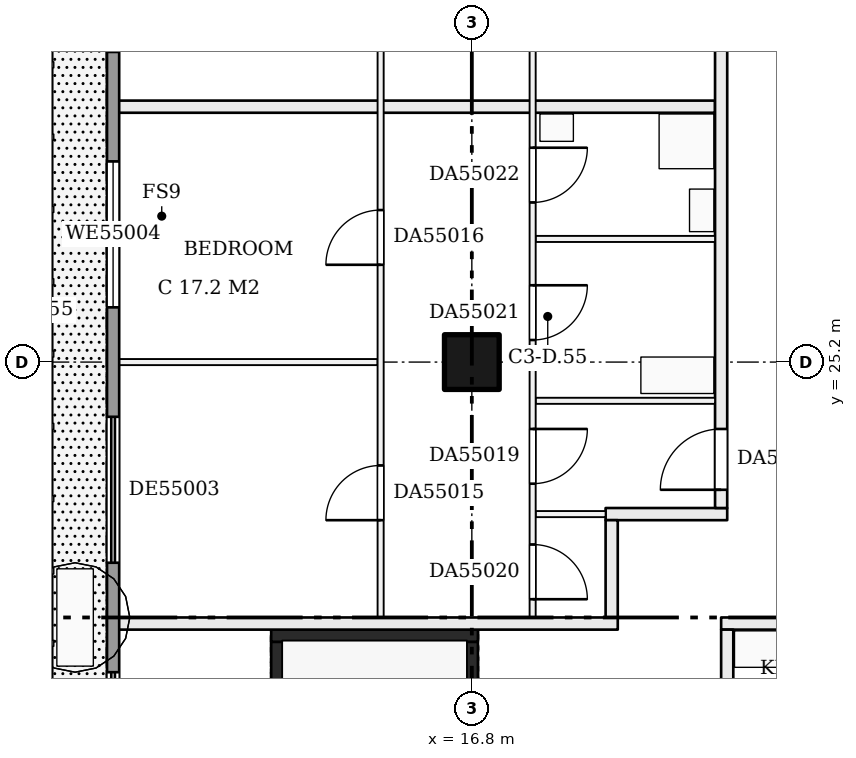
"""IFC4 building model, lengths in metres.
Left out: names, types, materials, properties, quantities, classifications, styles, units other than length and angle.
Written with IfcOpenShell. Run it as: python <this file> out.ifc"""

import sys

from ifc_helpers import new_model, si_unit, direction, frame, frame_2d, origin, origin_2d, place, context, subcontext, project, spatial, rectangle, extrude, element, fill, save


model = new_model("IFC4")
c1 = context("Model", 3, precision=1e-05, world=origin(), true_north=direction((0.0, 1.0)))
c2 = subcontext(c1, "Body", "Model", "MODEL_VIEW")
j1 = project(units=[si_unit("LENGTHUNIT", "METRE"), si_unit("PLANEANGLEUNIT", "RADIAN")], contexts=[c1])
p1 = place(None, origin())
s1 = spatial("IfcSite", under=j1, at=p1, CompositionType="ELEMENT")
p2 = place(p1, origin())
s2 = spatial("IfcBuilding", under=s1, at=p2, CompositionType="ELEMENT")
p3 = place(p2, frame((0.0, 0.0, 214.2)))
s3 = spatial("IfcBuildingStorey", under=s2, at=p3, CompositionType="ELEMENT", Elevation=214.2)
p4 = place(p3, frame((16.8, 25.2, 0.0), z_axis=(0.0, 0.0, 1.0), x_axis=(1.0, 0.0, 0.0)))
e1 = element("IfcColumn", 1, at=p4, inside=s3, PredefinedType="COLUMN", context=c2, shape_type="SweptSolid", body=[
    extrude(rectangle(XDim=0.9, YDim=0.9, at=origin_2d()), origin(), (0.0, 0.0, 1.0), 3.22),
])
p5 = place(p3, frame((13.6, 13.8, 0.0), z_axis=(0.0, 0.0, 1.0), x_axis=(0.0, 1.0, 0.0)))
e2 = element("IfcWall", 2, at=p5, inside=s3, PredefinedType="SHEAR", context=c2, shape_type="SweptSolid", body=[
    extrude(rectangle(XDim=6.8, YDim=0.2, at=frame_2d((3.4, 0.0))), origin(), (0.0, 0.0, 1.0), 3.22),
])
p6 = place(p3, frame((16.8, 13.8, 0.0), z_axis=(0.0, 0.0, 1.0), x_axis=(0.0, 1.0, 0.0)))
e3 = element("IfcWall", 3, at=p6, inside=s3, PredefinedType="SHEAR", context=c2, shape_type="SweptSolid", body=[
    extrude(rectangle(XDim=6.8, YDim=0.2, at=frame_2d((3.4, 0.0))), origin(), (0.0, 0.0, 1.0), 3.22),
])
p7 = place(p6, frame((0.1, 0.0, 0.0)))
e4 = element("IfcOpeningElement", 4, at=p7, cuts=e3, PredefinedType="OPENING", context=c2, shape_type="SweptSolid", body=[
    extrude(rectangle(XDim=1.0, YDim=2.1, at=frame_2d((0.5, 1.05))), frame((0.0, 0.11, 0.0), z_axis=(0.0, -1.0, 0.0), x_axis=(1.0, 0.0, 0.0)), (0.0, 0.0, 1.0), 0.22),
])
p8 = place(p3, frame((13.5, 20.7, 0.0), z_axis=(0.0, 0.0, 1.0), x_axis=(1.0, 0.0, 0.0)))
e5 = element("IfcWall", 5, at=p8, inside=s3, PredefinedType="SHEAR", context=c2, shape_type="SweptSolid", body=[
    extrude(rectangle(XDim=3.4, YDim=0.2, at=frame_2d((1.7, 0.0))), origin(), (0.0, 0.0, 1.0), 3.22),
])
p9 = place(p3, frame((10.9, 20.9, 0.0), z_axis=(0.0, 0.0, 1.0), x_axis=(1.0, 0.0, 0.0)))
e6 = element("IfcWall", 6, at=p9, inside=s3, PredefinedType="PARTITIONING", context=c2, shape_type="SweptSolid", body=[
    extrude(rectangle(XDim=8.3, YDim=0.2, at=frame_2d((4.15, 0.0))), origin(), (0.0, 0.0, 1.0), 3.22),
])
p10 = place(p3, frame((20.9, 20.9, 0.0), z_axis=(0.0, 0.0, 1.0), x_axis=(1.0, 0.0, 0.0)))
e7 = element("IfcWall", 7, at=p10, inside=s3, PredefinedType="PARTITIONING", context=c2, shape_type="SweptSolid", body=[
    extrude(rectangle(XDim=19.3, YDim=0.2, at=frame_2d((9.65, 0.0))), origin(), (0.0, 0.0, 1.0), 3.22),
])
p11 = place(p10, frame((7.016, 0.0, 0.0)))
e8 = element("IfcOpeningElement", 8, at=p11, cuts=e7, PredefinedType="OPENING", context=c2, shape_type="SweptSolid", body=[
    extrude(rectangle(XDim=1.0, YDim=2.1, at=frame_2d((0.5, 1.05))), frame((0.0, 0.11, 0.0), z_axis=(0.0, -1.0, 0.0), x_axis=(1.0, 0.0, 0.0)), (0.0, 0.0, 1.0), 0.22),
])
p12 = place(p10, frame((13.633, 0.0, 0.0)))
e9 = element("IfcOpeningElement", 9, at=p12, cuts=e7, PredefinedType="OPENING", context=c2, shape_type="SweptSolid", body=[
    extrude(rectangle(XDim=1.0, YDim=2.1, at=frame_2d((0.5, 1.05))), frame((0.0, 0.11, 0.0), z_axis=(0.0, -1.0, 0.0), x_axis=(1.0, 0.0, 0.0)), (0.0, 0.0, 1.0), 0.22),
])
p13 = place(p3, frame((17.85, 22.7, 0.0), z_axis=(0.0, 0.0, 1.0), x_axis=(1.0, 0.0, 0.0)))
e10 = element("IfcWall", 10, at=p13, inside=s3, PredefinedType="PARTITIONING", context=c2, shape_type="SweptSolid", body=[
    extrude(rectangle(XDim=1.15, YDim=0.1, at=frame_2d((0.575, 0.0))), origin(), (0.0, 0.0, 1.0), 3.22),
])
p14 = place(p3, frame((19.0, 22.7, 0.0), z_axis=(0.0, 0.0, 1.0), x_axis=(1.0, 0.0, 0.0)))
e11 = element("IfcWall", 11, at=p14, inside=s3, PredefinedType="PARTITIONING", context=c2, shape_type="SweptSolid", body=[
    extrude(rectangle(XDim=2.0, YDim=0.2, at=frame_2d((1.0, 0.0))), origin(), (0.0, 0.0, 1.0), 3.22),
])
p15 = place(p3, frame((17.85, 24.563, 0.0), z_axis=(0.0, 0.0, 1.0), x_axis=(1.0, 0.0, 0.0)))
e12 = element("IfcWall", 12, at=p15, inside=s3, PredefinedType="PARTITIONING", context=c2, shape_type="SweptSolid", body=[
    extrude(rectangle(XDim=2.95, YDim=0.1, at=frame_2d((1.475, 0.0))), origin(), (0.0, 0.0, 1.0), 3.22),
])
p16 = place(p3, frame((10.9, 25.2, 0.0), z_axis=(0.0, 0.0, 1.0), x_axis=(1.0, 0.0, 0.0)))
e13 = element("IfcWall", 13, at=p16, inside=s3, PredefinedType="PARTITIONING", context=c2, shape_type="SweptSolid", body=[
    extrude(rectangle(XDim=4.35, YDim=0.1, at=frame_2d((2.175, 0.0))), origin(), (0.0, 0.0, 1.0), 3.22),
])
p17 = place(p3, frame((17.85, 27.225, 0.0), z_axis=(0.0, 0.0, 1.0), x_axis=(1.0, 0.0, 0.0)))
e14 = element("IfcWall", 14, at=p17, inside=s3, PredefinedType="PARTITIONING", context=c2, shape_type="SweptSolid", body=[
    extrude(rectangle(XDim=2.95, YDim=0.1, at=frame_2d((1.475, 0.0))), origin(), (0.0, 0.0, 1.0), 3.22),
])
p18 = place(p3, frame((10.9, 29.4, 0.0), z_axis=(0.0, 0.0, 1.0), x_axis=(1.0, 0.0, 0.0)))
e15 = element("IfcWall", 15, at=p18, inside=s3, PredefinedType="PARTITIONING", context=c2, shape_type="SweptSolid", body=[
    extrude(rectangle(XDim=9.9, YDim=0.2, at=frame_2d((4.95, 0.0))), origin(), (0.0, 0.0, 1.0), 3.22),
])
p19 = place(p3, frame((15.3, 21.0, 0.0), z_axis=(0.0, 0.0, 1.0), x_axis=(0.0, 1.0, 0.0)))
e16 = element("IfcWall", 16, at=p19, inside=s3, PredefinedType="PARTITIONING", context=c2, shape_type="SweptSolid", body=[
    extrude(rectangle(XDim=19.0, YDim=0.1, at=frame_2d((9.5, 0.0))), origin(), (0.0, 0.0, 1.0), 3.22),
])
p20 = place(p19, frame((1.6, 0.0, 0.0)))
e17 = element("IfcOpeningElement", 17, at=p20, cuts=e16, PredefinedType="OPENING", context=c2, shape_type="SweptSolid", body=[
    extrude(rectangle(XDim=0.9, YDim=2.1, at=frame_2d((0.45, 1.05))), frame((0.0, 0.06, 0.0), z_axis=(0.0, -1.0, 0.0), x_axis=(1.0, 0.0, 0.0)), (0.0, 0.0, 1.0), 0.12),
])
p21 = place(p19, frame((5.8, 0.0, 0.0)))
e18 = element("IfcOpeningElement", 18, at=p21, cuts=e16, PredefinedType="OPENING", context=c2, shape_type="SweptSolid", body=[
    extrude(rectangle(XDim=0.9, YDim=2.1, at=frame_2d((0.45, 1.05))), frame((0.0, 0.06, 0.0), z_axis=(0.0, -1.0, 0.0), x_axis=(1.0, 0.0, 0.0)), (0.0, 0.0, 1.0), 0.12),
])
p22 = place(p19, frame((10.0, 0.0, 0.0)))
e19 = element("IfcOpeningElement", 19, at=p22, cuts=e16, PredefinedType="OPENING", context=c2, shape_type="SweptSolid", body=[
    extrude(rectangle(XDim=0.9, YDim=2.1, at=frame_2d((0.45, 1.05))), frame((0.0, 0.06, 0.0), z_axis=(0.0, -1.0, 0.0), x_axis=(1.0, 0.0, 0.0)), (0.0, 0.0, 1.0), 0.12),
])
p23 = place(p19, frame((15.4, 0.0, 0.0)))
e20 = element("IfcOpeningElement", 20, at=p23, cuts=e16, PredefinedType="OPENING", context=c2, shape_type="SweptSolid", body=[
    extrude(rectangle(XDim=0.9, YDim=2.1, at=frame_2d((0.45, 1.05))), frame((0.0, 0.06, 0.0), z_axis=(0.0, -1.0, 0.0), x_axis=(1.0, 0.0, 0.0)), (0.0, 0.0, 1.0), 0.12),
])
p24 = place(p3, frame((17.8, 21.0, 0.0), z_axis=(0.0, 0.0, 1.0), x_axis=(0.0, 1.0, 0.0)))
e21 = element("IfcWall", 21, at=p24, inside=s3, PredefinedType="PARTITIONING", context=c2, shape_type="SweptSolid", body=[
    extrude(rectangle(XDim=19.0, YDim=0.1, at=frame_2d((9.5, 0.0))), origin(), (0.0, 0.0, 1.0), 3.22),
])
p25 = place(p24, frame((2.2, 0.0, 0.0)))
e22 = element("IfcOpeningElement", 22, at=p25, cuts=e21, PredefinedType="OPENING", context=c2, shape_type="SweptSolid", body=[
    extrude(rectangle(XDim=0.9, YDim=2.1, at=frame_2d((0.45, 1.05))), frame((0.0, 0.06, 0.0), z_axis=(0.0, -1.0, 0.0), x_axis=(1.0, 0.0, 0.0)), (0.0, 0.0, 1.0), 0.12),
])
p26 = place(p24, frame((0.3, 0.0, 0.0)))
e23 = element("IfcOpeningElement", 23, at=p26, cuts=e21, PredefinedType="OPENING", context=c2, shape_type="SweptSolid", body=[
    extrude(rectangle(XDim=0.9, YDim=2.1, at=frame_2d((0.45, 1.05))), frame((0.0, 0.06, 0.0), z_axis=(0.0, -1.0, 0.0), x_axis=(1.0, 0.0, 0.0)), (0.0, 0.0, 1.0), 0.12),
])
p27 = place(p24, frame((4.563, 0.0, 0.0)))
e24 = element("IfcOpeningElement", 24, at=p27, cuts=e21, PredefinedType="OPENING", context=c2, shape_type="SweptSolid", body=[
    extrude(rectangle(XDim=0.9, YDim=2.1, at=frame_2d((0.45, 1.05))), frame((0.0, 0.06, 0.0), z_axis=(0.0, -1.0, 0.0), x_axis=(1.0, 0.0, 0.0)), (0.0, 0.0, 1.0), 0.12),
])
p28 = place(p24, frame((6.825, 0.0, 0.0)))
e25 = element("IfcOpeningElement", 25, at=p28, cuts=e21, PredefinedType="OPENING", context=c2, shape_type="SweptSolid", body=[
    extrude(rectangle(XDim=0.9, YDim=2.1, at=frame_2d((0.45, 1.05))), frame((0.0, 0.06, 0.0), z_axis=(0.0, -1.0, 0.0), x_axis=(1.0, 0.0, 0.0)), (0.0, 0.0, 1.0), 0.12),
])
p29 = place(p24, frame((9.6, 0.0, 0.0)))
e26 = element("IfcOpeningElement", 26, at=p29, cuts=e21, PredefinedType="OPENING", context=c2, shape_type="SweptSolid", body=[
    extrude(rectangle(XDim=0.9, YDim=2.1, at=frame_2d((0.45, 1.05))), frame((0.0, 0.06, 0.0), z_axis=(0.0, -1.0, 0.0), x_axis=(1.0, 0.0, 0.0)), (0.0, 0.0, 1.0), 0.12),
])
p30 = place(p24, frame((13.233, 0.0, 0.0)))
e27 = element("IfcOpeningElement", 27, at=p30, cuts=e21, PredefinedType="OPENING", context=c2, shape_type="SweptSolid", body=[
    extrude(rectangle(XDim=0.9, YDim=2.1, at=frame_2d((0.45, 1.05))), frame((0.0, 0.06, 0.0), z_axis=(0.0, -1.0, 0.0), x_axis=(1.0, 0.0, 0.0)), (0.0, 0.0, 1.0), 0.12),
])
p31 = place(p24, frame((16.967, 0.0, 0.0)))
e28 = element("IfcOpeningElement", 28, at=p31, cuts=e21, PredefinedType="OPENING", context=c2, shape_type="SweptSolid", body=[
    extrude(rectangle(XDim=0.9, YDim=2.1, at=frame_2d((0.45, 1.05))), frame((0.0, 0.06, 0.0), z_axis=(0.0, -1.0, 0.0), x_axis=(1.0, 0.0, 0.0)), (0.0, 0.0, 1.0), 0.12),
])
p32 = place(p3, frame((19.1, 21.0, 0.0), z_axis=(0.0, 0.0, 1.0), x_axis=(0.0, 1.0, 0.0)))
e29 = element("IfcWall", 29, at=p32, inside=s3, PredefinedType="PARTITIONING", context=c2, shape_type="SweptSolid", body=[
    extrude(rectangle(XDim=1.6, YDim=0.2, at=frame_2d((0.8, 0.0))), origin(), (0.0, 0.0, 1.0), 3.22),
])
p33 = place(p3, frame((20.9, 22.8, 0.0), z_axis=(0.0, 0.0, 1.0), x_axis=(0.0, 1.0, 0.0)))
e30 = element("IfcWall", 30, at=p33, inside=s3, PredefinedType="PARTITIONING", context=c2, shape_type="SweptSolid", body=[
    extrude(rectangle(XDim=17.2, YDim=0.2, at=frame_2d((8.6, 0.0))), origin(), (0.0, 0.0, 1.0), 3.22),
])
p34 = place(p33, frame((0.3, 0.0, 0.0)))
e31 = element("IfcOpeningElement", 31, at=p34, cuts=e30, PredefinedType="OPENING", context=c2, shape_type="SweptSolid", body=[
    extrude(rectangle(XDim=1.0, YDim=2.1, at=frame_2d((0.5, 1.05))), frame((0.0, 0.11, 0.0), z_axis=(0.0, -1.0, 0.0), x_axis=(1.0, 0.0, 0.0)), (0.0, 0.0, 1.0), 0.22),
])
p35 = place(p33, frame((7.7, 0.0, 0.0)))
e32 = element("IfcOpeningElement", 32, at=p35, cuts=e30, PredefinedType="OPENING", context=c2, shape_type="SweptSolid", body=[
    extrude(rectangle(XDim=1.0, YDim=2.1, at=frame_2d((0.5, 1.05))), frame((0.0, 0.11, 0.0), z_axis=(0.0, -1.0, 0.0), x_axis=(1.0, 0.0, 0.0)), (0.0, 0.0, 1.0), 0.22),
])
p36 = place(p3, frame((21.0, 13.7, 0.0), z_axis=(0.0, 0.0, 1.0), x_axis=(0.0, 1.0, 0.0)))
e33 = element("IfcWall", 33, at=p36, inside=s3, PredefinedType="PARTITIONING", context=c2, shape_type="SweptSolid", body=[
    extrude(rectangle(XDim=7.1, YDim=0.2, at=frame_2d((3.55, 0.0))), origin(), (0.0, 0.0, 1.0), 3.22),
])
p37 = place(p3, frame((10.9, 42.0, 0.0), z_axis=(0.0, 0.0, 1.0), x_axis=(0.0, -1.0, 0.0)))
e34 = element("IfcWall", 34, at=p37, inside=s3, PredefinedType="SOLIDWALL", context=c2, shape_type="SweptSolid", body=[
    extrude(rectangle(XDim=28.6, YDim=0.2, at=frame_2d((14.3, 0.0))), origin(), (0.0, 0.0, 1.0), 3.22),
])
p38 = place(p37, frame((25.9, 0.0, 0.0)))
e35 = element("IfcOpeningElement", 35, at=p38, cuts=e34, PredefinedType="OPENING", context=c2, shape_type="SweptSolid", body=[
    extrude(rectangle(XDim=2.4, YDim=2.2, at=frame_2d((1.2, 1.1))), frame((0.0, 0.11, 0.0), z_axis=(0.0, -1.0, 0.0), x_axis=(1.0, 0.0, 0.0)), (0.0, 0.0, 1.0), 0.22),
])
p39 = place(p37, frame((21.9, 0.0, 0.0)))
e36 = element("IfcOpeningElement", 36, at=p39, cuts=e34, PredefinedType="OPENING", context=c2, shape_type="SweptSolid", body=[
    extrude(rectangle(XDim=2.4, YDim=2.2, at=frame_2d((1.2, 1.1))), frame((0.0, 0.11, 0.0), z_axis=(0.0, -1.0, 0.0), x_axis=(1.0, 0.0, 0.0)), (0.0, 0.0, 1.0), 0.22),
])
p40 = place(p37, frame((17.7, 0.0, 0.0)))
e37 = element("IfcOpeningElement", 37, at=p40, cuts=e34, PredefinedType="OPENING", context=c2, shape_type="SweptSolid", body=[
    extrude(rectangle(XDim=2.4, YDim=2.2, at=frame_2d((1.2, 1.1))), frame((0.0, 0.11, 0.0), z_axis=(0.0, -1.0, 0.0), x_axis=(1.0, 0.0, 0.0)), (0.0, 0.0, 1.0), 0.22),
])
p41 = place(p37, frame((13.5, 0.0, 0.9)))
e38 = element("IfcOpeningElement", 38, at=p41, cuts=e34, PredefinedType="OPENING", context=c2, shape_type="SweptSolid", body=[
    extrude(rectangle(XDim=2.4, YDim=1.5, at=frame_2d((1.2, 0.75))), frame((0.0, 0.11, 0.0), z_axis=(0.0, -1.0, 0.0), x_axis=(1.0, 0.0, 0.0)), (0.0, 0.0, 1.0), 0.22),
])
p42 = place(p37, frame((9.3, 0.0, 0.0)))
e39 = element("IfcOpeningElement", 39, at=p42, cuts=e34, PredefinedType="OPENING", context=c2, shape_type="SweptSolid", body=[
    extrude(rectangle(XDim=2.4, YDim=2.2, at=frame_2d((1.2, 1.1))), frame((0.0, 0.11, 0.0), z_axis=(0.0, -1.0, 0.0), x_axis=(1.0, 0.0, 0.0)), (0.0, 0.0, 1.0), 0.22),
])
p43 = place(p37, frame((5.1, 0.0, 0.9)))
e40 = element("IfcOpeningElement", 40, at=p43, cuts=e34, PredefinedType="OPENING", context=c2, shape_type="SweptSolid", body=[
    extrude(rectangle(XDim=2.4, YDim=1.5, at=frame_2d((1.2, 0.75))), frame((0.0, 0.11, 0.0), z_axis=(0.0, -1.0, 0.0), x_axis=(1.0, 0.0, 0.0)), (0.0, 0.0, 1.0), 0.22),
])
p44 = place(p37, frame((2.0, 0.0, 0.9)))
e41 = element("IfcOpeningElement", 41, at=p44, cuts=e34, PredefinedType="OPENING", context=c2, shape_type="SweptSolid", body=[
    extrude(rectangle(XDim=1.3, YDim=1.5, at=frame_2d((0.65, 0.75))), frame((0.0, 0.11, 0.0), z_axis=(0.0, -1.0, 0.0), x_axis=(1.0, 0.0, 0.0)), (0.0, 0.0, 1.0), 0.22),
])
p45 = place(p20, origin())
e42 = element("IfcDoor", 42, at=p45, inside=s3, OperationType="SINGLE_SWING_LEFT", PredefinedType="DOOR", context=c2, shape_type="SweptSolid", body=[
    extrude(rectangle(XDim=0.9, YDim=2.1, at=frame_2d((0.45, 1.05))), frame((0.0, 0.025, 0.0), z_axis=(0.0, -1.0, 0.0), x_axis=(1.0, 0.0, 0.0)), (0.0, 0.0, 1.0), 0.05),
])
fill(e17, e42)
p46 = place(p21, origin())
e43 = element("IfcDoor", 43, at=p46, inside=s3, OperationType="SINGLE_SWING_LEFT", PredefinedType="DOOR", context=c2, shape_type="SweptSolid", body=[
    extrude(rectangle(XDim=0.9, YDim=2.1, at=frame_2d((0.45, 1.05))), frame((0.0, 0.025, 0.0), z_axis=(0.0, -1.0, 0.0), x_axis=(1.0, 0.0, 0.0)), (0.0, 0.0, 1.0), 0.05),
])
fill(e18, e43)
p47 = place(p25, frame((0.9, 0.0, 0.0), z_axis=(0.0, 0.0, 1.0), x_axis=(-1.0, 0.0, 0.0)))
e44 = element("IfcDoor", 44, at=p47, inside=s3, OperationType="SINGLE_SWING_LEFT", PredefinedType="DOOR", context=c2, shape_type="SweptSolid", body=[
    extrude(rectangle(XDim=0.9, YDim=2.1, at=frame_2d((0.45, 1.05))), frame((0.0, 0.025, 0.0), z_axis=(0.0, -1.0, 0.0), x_axis=(1.0, 0.0, 0.0)), (0.0, 0.0, 1.0), 0.05),
])
fill(e22, e44)
p48 = place(p26, frame((0.9, 0.0, 0.0), z_axis=(0.0, 0.0, 1.0), x_axis=(-1.0, 0.0, 0.0)))
e45 = element("IfcDoor", 45, at=p48, inside=s3, OperationType="SINGLE_SWING_RIGHT", PredefinedType="DOOR", context=c2, shape_type="SweptSolid", body=[
    extrude(rectangle(XDim=0.9, YDim=2.1, at=frame_2d((0.45, 1.05))), frame((0.0, 0.025, 0.0), z_axis=(0.0, -1.0, 0.0), x_axis=(1.0, 0.0, 0.0)), (0.0, 0.0, 1.0), 0.05),
])
fill(e23, e45)
p49 = place(p27, frame((0.9, 0.0, 0.0), z_axis=(0.0, 0.0, 1.0), x_axis=(-1.0, 0.0, 0.0)))
e46 = element("IfcDoor", 46, at=p49, inside=s3, OperationType="SINGLE_SWING_LEFT", PredefinedType="DOOR", context=c2, shape_type="SweptSolid", body=[
    extrude(rectangle(XDim=0.9, YDim=2.1, at=frame_2d((0.45, 1.05))), frame((0.0, 0.025, 0.0), z_axis=(0.0, -1.0, 0.0), x_axis=(1.0, 0.0, 0.0)), (0.0, 0.0, 1.0), 0.05),
])
fill(e24, e46)
p50 = place(p28, frame((0.9, 0.0, 0.0), z_axis=(0.0, 0.0, 1.0), x_axis=(-1.0, 0.0, 0.0)))
e47 = element("IfcDoor", 47, at=p50, inside=s3, OperationType="SINGLE_SWING_LEFT", PredefinedType="DOOR", context=c2, shape_type="SweptSolid", body=[
    extrude(rectangle(XDim=0.9, YDim=2.1, at=frame_2d((0.45, 1.05))), frame((0.0, 0.025, 0.0), z_axis=(0.0, -1.0, 0.0), x_axis=(1.0, 0.0, 0.0)), (0.0, 0.0, 1.0), 0.05),
])
fill(e25, e47)
p51 = place(p34, origin())
e48 = element("IfcDoor", 48, at=p51, inside=s3, OperationType="SINGLE_SWING_LEFT", PredefinedType="DOOR", context=c2, shape_type="SweptSolid", body=[
    extrude(rectangle(XDim=1.0, YDim=2.1, at=frame_2d((0.5, 1.05))), frame((0.0, 0.025, 0.0), z_axis=(0.0, -1.0, 0.0), x_axis=(1.0, 0.0, 0.0)), (0.0, 0.0, 1.0), 0.05),
])
fill(e31, e48)
p52 = place(p39, origin())
e49 = element("IfcDoor", 49, at=p52, inside=s3, OperationType="DOUBLE_DOOR_SLIDING", PredefinedType="DOOR", context=c2, shape_type="SweptSolid", body=[
    extrude(rectangle(XDim=2.4, YDim=2.2, at=frame_2d((1.2, 1.1))), frame((0.0, 0.025, 0.0), z_axis=(0.0, -1.0, 0.0), x_axis=(1.0, 0.0, 0.0)), (0.0, 0.0, 1.0), 0.05),
])
fill(e36, e49)
p53 = place(p40, origin())
e50 = element("IfcDoor", 50, at=p53, inside=s3, OperationType="DOUBLE_DOOR_SLIDING", PredefinedType="DOOR", context=c2, shape_type="SweptSolid", body=[
    extrude(rectangle(XDim=2.4, YDim=2.2, at=frame_2d((1.2, 1.1))), frame((0.0, 0.025, 0.0), z_axis=(0.0, -1.0, 0.0), x_axis=(1.0, 0.0, 0.0)), (0.0, 0.0, 1.0), 0.05),
])
fill(e37, e50)
p54 = place(p41, origin())
e51 = element("IfcWindow", 51, at=p54, inside=s3, PartitioningType="SINGLE_PANEL", PredefinedType="WINDOW", context=c2, shape_type="SweptSolid", body=[
    extrude(rectangle(XDim=2.4, YDim=1.5, at=frame_2d((1.2, 0.75))), frame((0.0, 0.03, 0.0), z_axis=(0.0, -1.0, 0.0), x_axis=(1.0, 0.0, 0.0)), (0.0, 0.0, 1.0), 0.06),
])
fill(e38, e51)
save(model, sys.argv[1])
